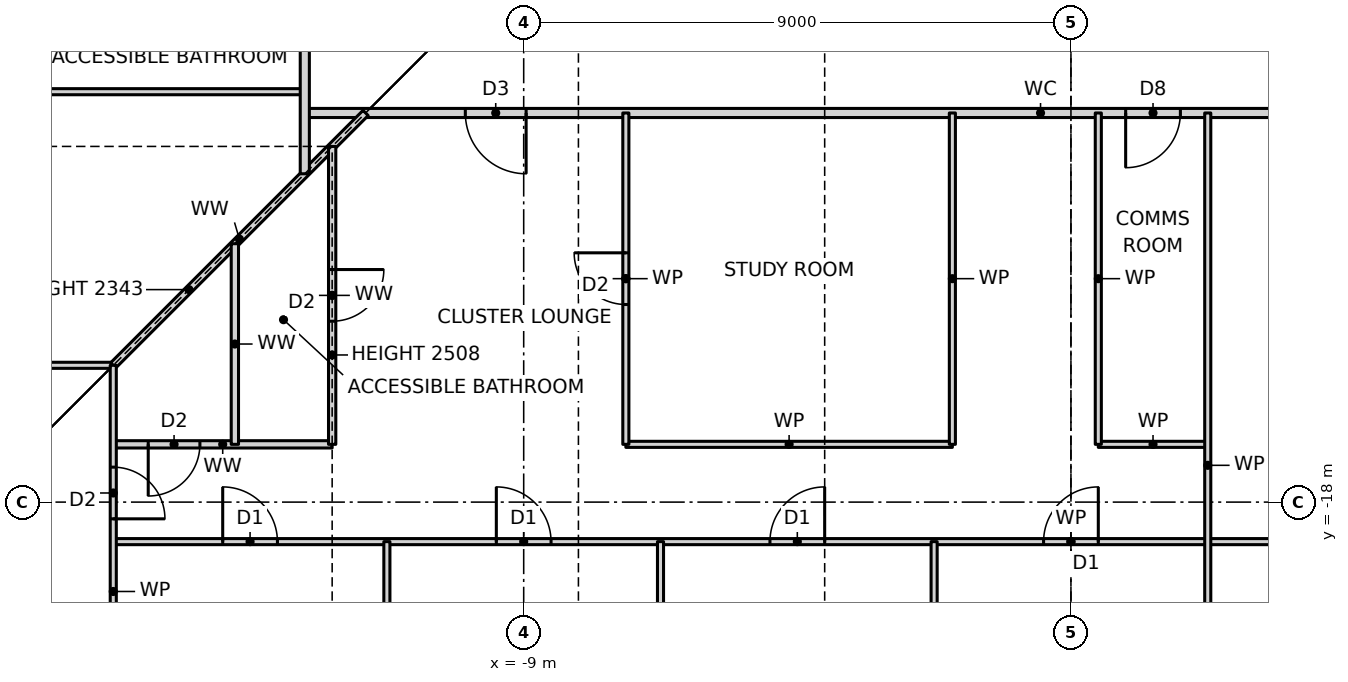
"""IFC4 building model, lengths in metres.
Left out: names, types, materials, properties, quantities, classifications, styles, units other than length and angle.
Written with IfcOpenShell. Run it as: python <this file> out.ifc"""

import sys

from ifc_helpers import new_model, si_unit, direction, frame, frame_2d, origin, place, context, subcontext, project, spatial, rectangle, extrude, element, fill, save


model = new_model("IFC4")
c1 = context("Model", 3, precision=1e-05, world=origin(), true_north=direction((0.0, 1.0)))
c2 = subcontext(c1, "Body", "Model", "MODEL_VIEW")
j1 = project(units=[si_unit("LENGTHUNIT", "METRE"), si_unit("PLANEANGLEUNIT", "RADIAN")], contexts=[c1])
p1 = place(None, origin())
s1 = spatial("IfcSite", under=j1, at=p1, CompositionType="ELEMENT")
p2 = place(p1, origin())
s2 = spatial("IfcBuilding", under=s1, at=p2, CompositionType="ELEMENT")
p3 = place(p2, frame((0.0, 0.0, 46.5)))
s3 = spatial("IfcBuildingStorey", under=s2, at=p3, CompositionType="ELEMENT", Elevation=46.5)
p4 = place(p3, frame((-15.75, -18.65, 0.0), z_axis=(0.0, 0.0, 1.0), x_axis=(1.0, 0.0, 0.0)))
e1 = element("IfcWall", 1, at=p4, inside=s3, PredefinedType="PARTITIONING", context=c2, shape_type="SweptSolid", body=[
    extrude(rectangle(XDim=31.5, YDim=0.1, at=frame_2d((15.75, 0.0))), origin(), (0.0, 0.0, 1.0), 3.27),
])
p5 = place(p4, frame((1.8, 0.0, 0.0)))
e2 = element("IfcOpeningElement", 2, at=p5, cuts=e1, PredefinedType="OPENING", context=c2, shape_type="SweptSolid", body=[
    extrude(rectangle(XDim=0.9, YDim=2.1, at=frame_2d((0.45, 1.05))), frame((0.0, 0.06, 0.0), z_axis=(0.0, -1.0, 0.0), x_axis=(1.0, 0.0, 0.0)), (0.0, 0.0, 1.0), 0.12),
])
p6 = place(p4, frame((6.3, 0.0, 0.0)))
e3 = element("IfcOpeningElement", 3, at=p6, cuts=e1, PredefinedType="OPENING", context=c2, shape_type="SweptSolid", body=[
    extrude(rectangle(XDim=0.9, YDim=2.1, at=frame_2d((0.45, 1.05))), frame((0.0, 0.06, 0.0), z_axis=(0.0, -1.0, 0.0), x_axis=(1.0, 0.0, 0.0)), (0.0, 0.0, 1.0), 0.12),
])
p7 = place(p4, frame((10.8, 0.0, 0.0)))
e4 = element("IfcOpeningElement", 4, at=p7, cuts=e1, PredefinedType="OPENING", context=c2, shape_type="SweptSolid", body=[
    extrude(rectangle(XDim=0.9, YDim=2.1, at=frame_2d((0.45, 1.05))), frame((0.0, 0.06, 0.0), z_axis=(0.0, -1.0, 0.0), x_axis=(1.0, 0.0, 0.0)), (0.0, 0.0, 1.0), 0.12),
])
p8 = place(p4, frame((15.3, 0.0, 0.0)))
e5 = element("IfcOpeningElement", 5, at=p8, cuts=e1, PredefinedType="OPENING", context=c2, shape_type="SweptSolid", body=[
    extrude(rectangle(XDim=0.9, YDim=2.1, at=frame_2d((0.45, 1.05))), frame((0.0, 0.06, 0.0), z_axis=(0.0, -1.0, 0.0), x_axis=(1.0, 0.0, 0.0)), (0.0, 0.0, 1.0), 0.12),
])
p9 = place(p4, frame((19.8, 0.0, 0.0)))
e6 = element("IfcOpeningElement", 6, at=p9, cuts=e1, PredefinedType="OPENING", context=c2, shape_type="SweptSolid", body=[
    extrude(rectangle(XDim=0.9, YDim=2.1, at=frame_2d((0.45, 1.05))), frame((0.0, 0.06, 0.0), z_axis=(0.0, -1.0, 0.0), x_axis=(1.0, 0.0, 0.0)), (0.0, 0.0, 1.0), 0.12),
])
p10 = place(p4, frame((24.3, 0.0, 0.0)))
e7 = element("IfcOpeningElement", 7, at=p10, cuts=e1, PredefinedType="OPENING", context=c2, shape_type="SweptSolid", body=[
    extrude(rectangle(XDim=0.9, YDim=2.1, at=frame_2d((0.45, 1.05))), frame((0.0, 0.06, 0.0), z_axis=(0.0, -1.0, 0.0), x_axis=(1.0, 0.0, 0.0)), (0.0, 0.0, 1.0), 0.12),
])
p11 = place(p4, frame((28.8, 0.0, 0.0)))
e8 = element("IfcOpeningElement", 8, at=p11, cuts=e1, PredefinedType="OPENING", context=c2, shape_type="SweptSolid", body=[
    extrude(rectangle(XDim=0.9, YDim=2.1, at=frame_2d((0.45, 1.05))), frame((0.0, 0.06, 0.0), z_axis=(0.0, -1.0, 0.0), x_axis=(1.0, 0.0, 0.0)), (0.0, 0.0, 1.0), 0.12),
])
p12 = place(p3, frame((-15.75, -17.05, 0.0), z_axis=(0.0, 0.0, 1.0), x_axis=(1.0, 0.0, 0.0)))
e9 = element("IfcWall", 9, at=p12, inside=s3, PredefinedType="PARTITIONING", context=c2, shape_type="SweptSolid", body=[
    extrude(rectangle(XDim=3.6, YDim=0.12, at=frame_2d((1.8, 0.0))), origin(), (0.0, 0.0, 1.0), 3.27),
])
p13 = place(p12, frame((0.575, 0.0, 0.0)))
e10 = element("IfcOpeningElement", 10, at=p13, cuts=e9, PredefinedType="OPENING", context=c2, shape_type="SweptSolid", body=[
    extrude(rectangle(XDim=0.85, YDim=2.1, at=frame_2d((0.425, 1.05))), frame((0.0, 0.07, 0.0), z_axis=(0.0, -1.0, 0.0), x_axis=(1.0, 0.0, 0.0)), (0.0, 0.0, 1.0), 0.14),
])
p14 = place(p3, frame((-7.32, -17.05, 0.0), z_axis=(0.0, 0.0, 1.0), x_axis=(1.0, 0.0, 0.0)))
e11 = element("IfcWall", 11, at=p14, inside=s3, PredefinedType="PARTITIONING", context=c2, shape_type="SweptSolid", body=[
    extrude(rectangle(XDim=5.37, YDim=0.1, at=frame_2d((2.685, 0.0))), origin(), (0.0, 0.0, 1.0), 3.27),
])
p15 = place(p3, frame((0.45, -17.05, 0.0), z_axis=(0.0, 0.0, 1.0), x_axis=(1.0, 0.0, 0.0)))
e12 = element("IfcWall", 12, at=p15, inside=s3, PredefinedType="PARTITIONING", context=c2, shape_type="SweptSolid", body=[
    extrude(rectangle(XDim=1.8, YDim=0.1, at=frame_2d((0.9, 0.0))), origin(), (0.0, 0.0, 1.0), 3.27),
])
p16 = place(p3, frame((-23.19, -15.75, 0.0), z_axis=(0.0, 0.0, 1.0), x_axis=(1.0, 0.0, 0.0)))
e13 = element("IfcWall", 13, at=p16, inside=s3, PredefinedType="PARTITIONING", context=c2, shape_type="SweptSolid", body=[
    extrude(rectangle(XDim=7.44, YDim=0.1, at=frame_2d((3.72, 0.0))), origin(), (0.0, 0.0, 1.0), 3.27),
])
p17 = place(p3, frame((-12.6, -11.6, 0.0), z_axis=(0.0, 0.0, 1.0), x_axis=(1.0, 0.0, 0.0)))
e14 = element("IfcWall", 14, at=p17, inside=s3, PredefinedType="PARTITIONING", context=c2, shape_type="SweptSolid", body=[
    extrude(rectangle(XDim=24.2, YDim=0.15, at=frame_2d((12.1, 0.0))), origin(), (0.0, 0.0, 1.0), 3.27),
])
p18 = place(p17, frame((2.64, 0.0, 0.0)))
e15 = element("IfcOpeningElement", 15, at=p18, cuts=e14, PredefinedType="OPENING", context=c2, shape_type="SweptSolid", body=[
    extrude(rectangle(XDim=1.0, YDim=2.1, at=frame_2d((0.5, 1.05))), frame((0.0, 0.085, 0.0), z_axis=(0.0, -1.0, 0.0), x_axis=(1.0, 0.0, 0.0)), (0.0, 0.0, 1.0), 0.17),
])
p19 = place(p17, frame((13.5, 0.0, 0.0)))
e16 = element("IfcOpeningElement", 16, at=p19, cuts=e14, PredefinedType="OPENING", context=c2, shape_type="SweptSolid", body=[
    extrude(rectangle(XDim=0.9, YDim=2.1, at=frame_2d((0.45, 1.05))), frame((0.0, 0.085, 0.0), z_axis=(0.0, -1.0, 0.0), x_axis=(1.0, 0.0, 0.0)), (0.0, 0.0, 1.0), 0.17),
])
p20 = place(p17, frame((22.025, 0.0, 0.0)))
e17 = element("IfcOpeningElement", 17, at=p20, cuts=e14, PredefinedType="OPENING", context=c2, shape_type="SweptSolid", body=[
    extrude(rectangle(XDim=1.0, YDim=2.1, at=frame_2d((0.5, 1.05))), frame((0.0, 0.085, 0.0), z_axis=(0.0, -1.0, 0.0), x_axis=(1.0, 0.0, 0.0)), (0.0, 0.0, 1.0), 0.17),
])
p21 = place(p3, frame((-23.19, -11.25, 0.0), z_axis=(0.0, 0.0, 1.0), x_axis=(1.0, 0.0, 0.0)))
e18 = element("IfcWall", 18, at=p21, inside=s3, PredefinedType="PARTITIONING", context=c2, shape_type="SweptSolid", body=[
    extrude(rectangle(XDim=10.59, YDim=0.1, at=frame_2d((5.295, 0.0))), origin(), (0.0, 0.0, 1.0), 3.27),
])
p22 = place(p21, frame((4.915, 0.0, 0.0)))
e19 = element("IfcOpeningElement", 19, at=p22, cuts=e18, PredefinedType="OPENING", context=c2, shape_type="SweptSolid", body=[
    extrude(rectangle(XDim=0.85, YDim=2.1, at=frame_2d((0.425, 1.05))), frame((0.0, 0.06, 0.0), z_axis=(0.0, -1.0, 0.0), x_axis=(1.0, 0.0, 0.0)), (0.0, 0.0, 1.0), 0.12),
])
p23 = place(p3, frame((-15.75, -15.75, 0.0), z_axis=(0.0, 0.0, 1.0), x_axis=(0.707106781187, 0.707106781187, 0.0)))
e20 = element("IfcWall", 20, at=p23, inside=s3, PredefinedType="PARTITIONING", context=c2, shape_type="SweptSolid", body=[
    extrude(rectangle(XDim=5.869, YDim=0.12, at=frame_2d((2.935, 0.0))), origin(), (0.0, 0.0, 1.0), 2.343),
])
p24 = place(p3, frame((2.25, -23.19, 0.0), z_axis=(0.0, 0.0, 1.0), x_axis=(0.0, 1.0, 0.0)))
e21 = element("IfcWall", 21, at=p24, inside=s3, PredefinedType="PARTITIONING", context=c2, shape_type="SweptSolid", body=[
    extrude(rectangle(XDim=11.59, YDim=0.1, at=frame_2d((5.795, 0.0))), origin(), (0.0, 0.0, 1.0), 3.27),
])
for number, where, z_axis, x_axis in (
    (22, (0.45, -17.05, 0.0), (0.0, 0.0, 1.0), (0.0, 1.0, 0.0)),
    (23, (-1.95, -17.05, 0.0), (0.0, 0.0, 1.0), (0.0, 1.0, 0.0)),
):
    element("IfcWall", number, at=place(p3, frame(where, z_axis=z_axis, x_axis=x_axis)), inside=s3, PredefinedType="PARTITIONING", context=c2, shape_type="SweptSolid", body=[
        extrude(rectangle(XDim=5.45, YDim=0.1, at=frame_2d((2.725, 0.0))), origin(), (0.0, 0.0, 1.0), 3.27),
    ])
for number, where, z_axis, x_axis in (
    (24, (-2.25, -23.19, 0.0), (0.0, 0.0, 1.0), (0.0, 1.0, 0.0)),
    (25, (-6.75, -23.19, 0.0), (0.0, 0.0, 1.0), (0.0, 1.0, 0.0)),
):
    element("IfcWall", number, at=place(p3, frame(where, z_axis=z_axis, x_axis=x_axis)), inside=s3, PredefinedType="PARTITIONING", context=c2, shape_type="SweptSolid", body=[
        extrude(rectangle(XDim=4.54, YDim=0.1, at=frame_2d((2.27, 0.0))), origin(), (0.0, 0.0, 1.0), 3.27),
    ])
p25 = place(p3, frame((-7.32, -17.05, 0.0), z_axis=(0.0, 0.0, 1.0), x_axis=(0.0, 1.0, 0.0)))
e26 = element("IfcWall", 26, at=p25, inside=s3, PredefinedType="PARTITIONING", context=c2, shape_type="SweptSolid", body=[
    extrude(rectangle(XDim=5.45, YDim=0.1, at=frame_2d((2.725, 0.0))), origin(), (0.0, 0.0, 1.0), 3.27),
])
p26 = place(p25, frame((2.3, 0.0, 0.0)))
e27 = element("IfcOpeningElement", 27, at=p26, cuts=e26, PredefinedType="OPENING", context=c2, shape_type="SweptSolid", body=[
    extrude(rectangle(XDim=0.85, YDim=2.1, at=frame_2d((0.425, 1.05))), frame((0.0, 0.06, 0.0), z_axis=(0.0, -1.0, 0.0), x_axis=(1.0, 0.0, 0.0)), (0.0, 0.0, 1.0), 0.12),
])
p27 = place(p3, frame((-11.25, -23.19, 0.0), z_axis=(0.0, 0.0, 1.0), x_axis=(0.0, 1.0, 0.0)))
e28 = element("IfcWall", 28, at=p27, inside=s3, PredefinedType="PARTITIONING", context=c2, shape_type="SweptSolid", body=[
    extrude(rectangle(XDim=4.54, YDim=0.1, at=frame_2d((2.27, 0.0))), origin(), (0.0, 0.0, 1.0), 3.27),
])
p28 = place(p3, frame((-12.15, -17.05, 0.0), z_axis=(0.0, 0.0, 1.0), x_axis=(0.0, 1.0, 0.0)))
e29 = element("IfcWall", 29, at=p28, inside=s3, PredefinedType="PARTITIONING", context=c2, shape_type="SweptSolid", body=[
    extrude(rectangle(XDim=4.9, YDim=0.12, at=frame_2d((2.45, 0.0))), origin(), (0.0, 0.0, 1.0), 2.508),
])
p29 = place(p28, frame((2.025, 0.0, 0.0)))
e30 = element("IfcOpeningElement", 30, at=p29, cuts=e29, PredefinedType="OPENING", context=c2, shape_type="SweptSolid", body=[
    extrude(rectangle(XDim=0.85, YDim=2.1, at=frame_2d((0.425, 1.05))), frame((0.0, 0.07, 0.0), z_axis=(0.0, -1.0, 0.0), x_axis=(1.0, 0.0, 0.0)), (0.0, 0.0, 1.0), 0.14),
])
p30 = place(p3, frame((-12.6, -12.6, 0.0), z_axis=(0.0, 0.0, 1.0), x_axis=(0.0, 1.0, 0.0)))
e31 = element("IfcWall", 31, at=p30, inside=s3, PredefinedType="PARTITIONING", context=c2, shape_type="SweptSolid", body=[
    extrude(rectangle(XDim=25.2, YDim=0.15, at=frame_2d((12.6, 0.0))), origin(), (0.0, 0.0, 1.0), 3.27),
])
p31 = place(p30, frame((7.15, 0.0, 0.0)))
e32 = element("IfcOpeningElement", 32, at=p31, cuts=e31, PredefinedType="OPENING", context=c2, shape_type="SweptSolid", body=[
    extrude(rectangle(XDim=1.0, YDim=2.1, at=frame_2d((0.5, 1.05))), frame((0.0, 0.085, 0.0), z_axis=(0.0, -1.0, 0.0), x_axis=(1.0, 0.0, 0.0)), (0.0, 0.0, 1.0), 0.17),
])
p32 = place(p3, frame((-13.75, -17.05, 0.0), z_axis=(0.0, 0.0, 1.0), x_axis=(0.0, 1.0, 0.0)))
e33 = element("IfcWall", 33, at=p32, inside=s3, PredefinedType="PARTITIONING", context=c2, shape_type="SweptSolid", body=[
    extrude(rectangle(XDim=3.3, YDim=0.12, at=frame_2d((1.65, 0.0))), origin(), (0.0, 0.0, 1.0), 3.27),
])
p33 = place(p3, frame((-15.75, -23.19, 0.0), z_axis=(0.0, 0.0, 1.0), x_axis=(0.0, 1.0, 0.0)))
e34 = element("IfcWall", 34, at=p33, inside=s3, PredefinedType="PARTITIONING", context=c2, shape_type="SweptSolid", body=[
    extrude(rectangle(XDim=7.44, YDim=0.1, at=frame_2d((3.72, 0.0))), origin(), (0.0, 0.0, 1.0), 3.27),
])
p34 = place(p33, frame((4.915, 0.0, 0.0)))
e35 = element("IfcOpeningElement", 35, at=p34, cuts=e34, PredefinedType="OPENING", context=c2, shape_type="SweptSolid", body=[
    extrude(rectangle(XDim=0.85, YDim=2.1, at=frame_2d((0.425, 1.05))), frame((0.0, 0.06, 0.0), z_axis=(0.0, -1.0, 0.0), x_axis=(1.0, 0.0, 0.0)), (0.0, 0.0, 1.0), 0.12),
])
p35 = place(p5, origin())
e36 = element("IfcDoor", 36, at=p35, inside=s3, OperationType="SINGLE_SWING_LEFT", PredefinedType="DOOR", context=c2, shape_type="SweptSolid", body=[
    extrude(rectangle(XDim=0.9, YDim=2.1, at=frame_2d((0.45, 1.05))), frame((0.0, 0.025, 0.0), z_axis=(0.0, -1.0, 0.0), x_axis=(1.0, 0.0, 0.0)), (0.0, 0.0, 1.0), 0.05),
])
fill(e2, e36)
p36 = place(p6, origin())
e37 = element("IfcDoor", 37, at=p36, inside=s3, OperationType="SINGLE_SWING_LEFT", PredefinedType="DOOR", context=c2, shape_type="SweptSolid", body=[
    extrude(rectangle(XDim=0.9, YDim=2.1, at=frame_2d((0.45, 1.05))), frame((0.0, 0.025, 0.0), z_axis=(0.0, -1.0, 0.0), x_axis=(1.0, 0.0, 0.0)), (0.0, 0.0, 1.0), 0.05),
])
fill(e3, e37)
p37 = place(p7, origin())
e38 = element("IfcDoor", 38, at=p37, inside=s3, OperationType="SINGLE_SWING_RIGHT", PredefinedType="DOOR", context=c2, shape_type="SweptSolid", body=[
    extrude(rectangle(XDim=0.9, YDim=2.1, at=frame_2d((0.45, 1.05))), frame((0.0, 0.025, 0.0), z_axis=(0.0, -1.0, 0.0), x_axis=(1.0, 0.0, 0.0)), (0.0, 0.0, 1.0), 0.05),
])
fill(e4, e38)
p38 = place(p8, origin())
e39 = element("IfcDoor", 39, at=p38, inside=s3, OperationType="SINGLE_SWING_RIGHT", PredefinedType="DOOR", context=c2, shape_type="SweptSolid", body=[
    extrude(rectangle(XDim=0.9, YDim=2.1, at=frame_2d((0.45, 1.05))), frame((0.0, 0.025, 0.0), z_axis=(0.0, -1.0, 0.0), x_axis=(1.0, 0.0, 0.0)), (0.0, 0.0, 1.0), 0.05),
])
fill(e5, e39)
p39 = place(p18, frame((1.0, 0.0, 0.0), z_axis=(0.0, 0.0, 1.0), x_axis=(-1.0, 0.0, 0.0)))
e40 = element("IfcDoor", 40, at=p39, inside=s3, OperationType="SINGLE_SWING_LEFT", PredefinedType="DOOR", context=c2, shape_type="SweptSolid", body=[
    extrude(rectangle(XDim=1.0, YDim=2.1, at=frame_2d((0.5, 1.05))), frame((0.0, 0.025, 0.0), z_axis=(0.0, -1.0, 0.0), x_axis=(1.0, 0.0, 0.0)), (0.0, 0.0, 1.0), 0.05),
])
fill(e15, e40)
p40 = place(p13, frame((0.85, 0.0, 0.0), z_axis=(0.0, 0.0, 1.0), x_axis=(-1.0, 0.0, 0.0)))
e41 = element("IfcDoor", 41, at=p40, inside=s3, OperationType="SINGLE_SWING_RIGHT", PredefinedType="DOOR", context=c2, shape_type="SweptSolid", body=[
    extrude(rectangle(XDim=0.85, YDim=2.1, at=frame_2d((0.425, 1.05))), frame((0.0, 0.025, 0.0), z_axis=(0.0, -1.0, 0.0), x_axis=(1.0, 0.0, 0.0)), (0.0, 0.0, 1.0), 0.05),
])
fill(e10, e41)
p41 = place(p29, frame((0.85, 0.0, 0.0), z_axis=(0.0, 0.0, 1.0), x_axis=(-1.0, 0.0, 0.0)))
e42 = element("IfcDoor", 42, at=p41, inside=s3, OperationType="SINGLE_SWING_LEFT", PredefinedType="DOOR", context=c2, shape_type="SweptSolid", body=[
    extrude(rectangle(XDim=0.85, YDim=2.1, at=frame_2d((0.425, 1.05))), frame((0.0, 0.025, 0.0), z_axis=(0.0, -1.0, 0.0), x_axis=(1.0, 0.0, 0.0)), (0.0, 0.0, 1.0), 0.05),
])
fill(e30, e42)
p42 = place(p26, origin())
e43 = element("IfcDoor", 43, at=p42, inside=s3, OperationType="SINGLE_SWING_RIGHT", PredefinedType="DOOR", context=c2, shape_type="SweptSolid", body=[
    extrude(rectangle(XDim=0.85, YDim=2.1, at=frame_2d((0.425, 1.05))), frame((0.0, 0.025, 0.0), z_axis=(0.0, -1.0, 0.0), x_axis=(1.0, 0.0, 0.0)), (0.0, 0.0, 1.0), 0.05),
])
fill(e27, e43)
p43 = place(p19, frame((0.9, 0.0, 0.0), z_axis=(0.0, 0.0, 1.0), x_axis=(-1.0, 0.0, 0.0)))
e44 = element("IfcDoor", 44, at=p43, inside=s3, OperationType="SINGLE_SWING_RIGHT", PredefinedType="DOOR", context=c2, shape_type="SweptSolid", body=[
    extrude(rectangle(XDim=0.9, YDim=2.1, at=frame_2d((0.45, 1.05))), frame((0.0, 0.025, 0.0), z_axis=(0.0, -1.0, 0.0), x_axis=(1.0, 0.0, 0.0)), (0.0, 0.0, 1.0), 0.05),
])
fill(e16, e44)
p44 = place(p34, frame((0.85, 0.0, 0.0), z_axis=(0.0, 0.0, 1.0), x_axis=(-1.0, 0.0, 0.0)))
e45 = element("IfcDoor", 45, at=p44, inside=s3, OperationType="SINGLE_SWING_RIGHT", PredefinedType="DOOR", context=c2, shape_type="SweptSolid", body=[
    extrude(rectangle(XDim=0.85, YDim=2.1, at=frame_2d((0.425, 1.05))), frame((0.0, 0.025, 0.0), z_axis=(0.0, -1.0, 0.0), x_axis=(1.0, 0.0, 0.0)), (0.0, 0.0, 1.0), 0.05),
])
fill(e35, e45)
save(model, sys.argv[1])
